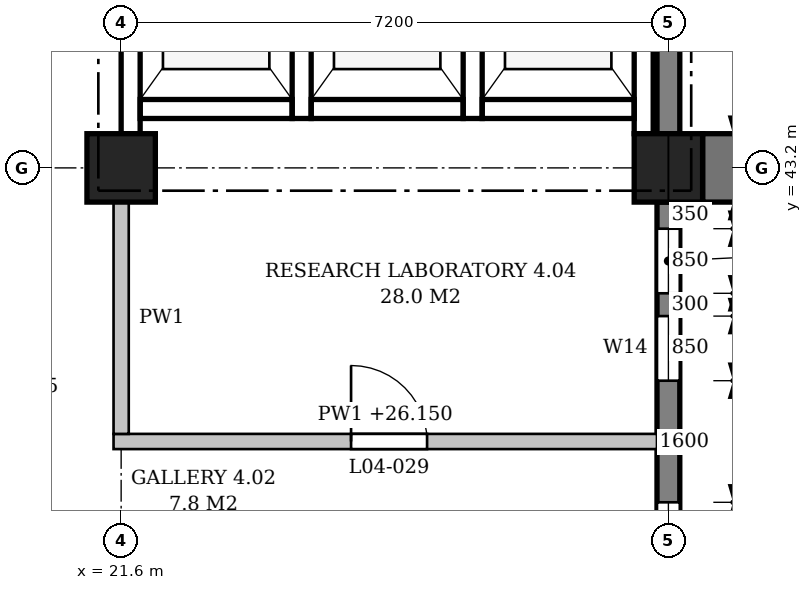
"""IFC4 building model, lengths in metres.
Left out: names, types, materials, properties, quantities, classifications, styles, units other than length and angle.
Written with IfcOpenShell. Run it as: python <this file> out.ifc"""

import sys

from ifc_helpers import new_model, si_unit, direction, frame, frame_2d, origin, origin_2d, place, context, subcontext, project, spatial, polyline, rectangle, outline, extrude, element, fill, save


model = new_model("IFC4")
c1 = context("Model", 3, precision=1e-05, world=origin(), true_north=direction((0.0, 1.0)))
c2 = subcontext(c1, "Body", "Model", "MODEL_VIEW")
j1 = project(units=[si_unit("LENGTHUNIT", "METRE"), si_unit("PLANEANGLEUNIT", "RADIAN")], contexts=[c1])
p1 = place(None, origin())
s1 = spatial("IfcSite", under=j1, at=p1, CompositionType="ELEMENT")
p2 = place(p1, origin())
s2 = spatial("IfcBuilding", under=s1, at=p2, CompositionType="ELEMENT")
p3 = place(p2, frame((0.0, 0.0, 21.6)))
s3 = spatial("IfcBuildingStorey", under=s2, at=p3, CompositionType="ELEMENT", Elevation=21.6)
for number, where, z_axis, x_axis in (
    (1, (21.6, 43.2, 0.0), (0.0, 0.0, 1.0), (1.0, 0.0, 0.0)),
    (2, (28.8, 43.2, 0.0), (0.0, 0.0, 1.0), (1.0, 0.0, 0.0)),
):
    element("IfcColumn", number, at=place(p3, frame(where, z_axis=z_axis, x_axis=x_axis)), inside=s3, PredefinedType="COLUMN", context=c2, shape_type="SweptSolid", body=[
        extrude(rectangle(XDim=0.9, YDim=0.9, at=origin_2d()), origin(), (0.0, 0.0, 1.0), 4.8),
    ])
p4 = place(p3, frame((28.8, 36.45, 0.0), z_axis=(0.0, 0.0, 1.0), x_axis=(0.0, 1.0, 0.0)))
e3 = element("IfcWall", 3, at=p4, inside=s3, PredefinedType="STANDARD", context=c2, shape_type="SweptSolid", body=[
    extrude(rectangle(XDim=6.3, YDim=0.3, at=frame_2d((3.15, 0.0))), origin(), (0.0, 0.0, 1.0), 3.95),
])
p5 = place(p4, frame((0.35, 0.0, 0.9)))
e4 = element("IfcOpeningElement", 4, at=p5, cuts=e3, PredefinedType="OPENING", context=c2, shape_type="SweptSolid", body=[
    extrude(outline(polyline([(0.0, 0.0), (0.85, 0.0), (0.85, 2.05), (0.425, 2.5), (0.0, 2.05), (0.0, 0.0)])), frame((0.0, 0.16, 0.0), z_axis=(0.0, -1.0, 0.0), x_axis=(1.0, 0.0, 0.0)), (0.0, 0.0, 1.0), 0.32),
])
p6 = place(p4, frame((1.5, 0.0, 0.9)))
e5 = element("IfcOpeningElement", 5, at=p6, cuts=e3, PredefinedType="OPENING", context=c2, shape_type="SweptSolid", body=[
    extrude(outline(polyline([(0.0, 0.0), (0.85, 0.0), (0.85, 2.05), (0.425, 2.5), (0.0, 2.05), (0.0, 0.0)])), frame((0.0, 0.16, 0.0), z_axis=(0.0, -1.0, 0.0), x_axis=(1.0, 0.0, 0.0)), (0.0, 0.0, 1.0), 0.32),
])
p7 = place(p4, frame((3.95, 0.0, 0.9)))
e6 = element("IfcOpeningElement", 6, at=p7, cuts=e3, PredefinedType="OPENING", context=c2, shape_type="SweptSolid", body=[
    extrude(outline(polyline([(0.0, 0.0), (0.85, 0.0), (0.85, 2.05), (0.425, 2.5), (0.0, 2.05), (0.0, 0.0)])), frame((0.0, 0.16, 0.0), z_axis=(0.0, -1.0, 0.0), x_axis=(1.0, 0.0, 0.0)), (0.0, 0.0, 1.0), 0.32),
])
p8 = place(p4, frame((5.1, 0.0, 0.9)))
e7 = element("IfcOpeningElement", 7, at=p8, cuts=e3, PredefinedType="OPENING", context=c2, shape_type="SweptSolid", body=[
    extrude(outline(polyline([(0.0, 0.0), (0.85, 0.0), (0.85, 2.05), (0.425, 2.5), (0.0, 2.05), (0.0, 0.0)])), frame((0.0, 0.16, 0.0), z_axis=(0.0, -1.0, 0.0), x_axis=(1.0, 0.0, 0.0)), (0.0, 0.0, 1.0), 0.32),
])
p9 = place(p3, frame((28.8, 43.65, 0.0), z_axis=(0.0, 0.0, 1.0), x_axis=(0.0, 1.0, 0.0)))
e8 = element("IfcWall", 8, at=p9, inside=s3, PredefinedType="STANDARD", context=c2, shape_type="SweptSolid", body=[
    extrude(rectangle(XDim=6.3, YDim=0.3, at=frame_2d((3.15, 0.0))), origin(), (0.0, 0.0, 1.0), 3.95),
])
p10 = place(p9, frame((3.95, 0.0, 0.9)))
e9 = element("IfcOpeningElement", 9, at=p10, cuts=e8, PredefinedType="OPENING", context=c2, shape_type="SweptSolid", body=[
    extrude(outline(polyline([(0.0, 0.0), (0.85, 0.0), (0.85, 2.05), (0.425, 2.5), (0.0, 2.05), (0.0, 0.0)])), frame((0.0, 0.16, 0.0), z_axis=(0.0, -1.0, 0.0), x_axis=(1.0, 0.0, 0.0)), (0.0, 0.0, 1.0), 0.32),
])
p11 = place(p9, frame((5.1, 0.0, 0.9)))
e10 = element("IfcOpeningElement", 10, at=p11, cuts=e8, PredefinedType="OPENING", context=c2, shape_type="SweptSolid", body=[
    extrude(outline(polyline([(0.0, 0.0), (0.85, 0.0), (0.85, 2.05), (0.425, 2.5), (0.0, 2.05), (0.0, 0.0)])), frame((0.0, 0.16, 0.0), z_axis=(0.0, -1.0, 0.0), x_axis=(1.0, 0.0, 0.0)), (0.0, 0.0, 1.0), 0.32),
])
p12 = place(p3, frame((29.25, 43.2, -0.25), z_axis=(0.0, 0.0, 1.0), x_axis=(1.0, 0.0, 0.0)))
e11 = element("IfcWall", 11, at=p12, inside=s3, PredefinedType="POLYGONAL", context=c2, shape_type="SweptSolid", body=[
    extrude(outline(polyline([(1.1, 0.0), (1.1, 19.2), (0.0, 19.2), (0.0, 0.0), (1.1, 0.0)])), frame((0.0, 0.45, 0.0), z_axis=(0.0, -1.0, 0.0), x_axis=(1.0, 0.0, 0.0)), (0.0, 0.0, 1.0), 0.9),
])
p13 = place(p3, frame((21.725, 43.65, -0.25), z_axis=(0.0, 0.0, 1.0), x_axis=(0.0, 1.0, 0.0)))
e12 = element("IfcWall", 12, at=p13, inside=s3, PredefinedType="SHEAR", context=c2, shape_type="SweptSolid", body=[
    extrude(rectangle(XDim=3.5, YDim=0.25, at=frame_2d((1.75, 0.0))), origin(), (0.0, 0.0, 1.0), 4.05),
])
for number, where, z_axis, x_axis in (
    (13, (23.975, 43.85, -0.25), (0.0, 0.0, 1.0), (0.0, 1.0, 0.0)),
    (14, (26.225, 43.85, -0.25), (0.0, 0.0, 1.0), (0.0, 1.0, 0.0)),
):
    element("IfcWall", number, at=place(p3, frame(where, z_axis=z_axis, x_axis=x_axis)), inside=s3, PredefinedType="SHEAR", context=c2, shape_type="SweptSolid", body=[
        extrude(rectangle(XDim=3.3, YDim=0.25, at=frame_2d((1.65, 0.0))), origin(), (0.0, 0.0, 1.0), 4.8),
    ])
p14 = place(p3, frame((28.475, 43.65, -0.25), z_axis=(0.0, 0.0, 1.0), x_axis=(0.0, 1.0, 0.0)))
e15 = element("IfcWall", 15, at=p14, inside=s3, PredefinedType="SHEAR", context=c2, shape_type="SweptSolid", body=[
    extrude(rectangle(XDim=3.5, YDim=0.25, at=frame_2d((1.75, 0.0))), origin(), (0.0, 0.0, 1.0), 4.8),
])
for number, where, z_axis, x_axis in (
    (16, (21.85, 43.975, -0.25), (0.0, 0.0, 1.0), (1.0, 0.0, 0.0)),
    (17, (24.1, 43.975, -0.25), (0.0, 0.0, 1.0), (1.0, 0.0, 0.0)),
    (18, (26.35, 43.975, -0.25), (0.0, 0.0, 1.0), (1.0, 0.0, 0.0)),
):
    element("IfcWall", number, at=place(p3, frame(where, z_axis=z_axis, x_axis=x_axis)), inside=s3, PredefinedType="SHEAR", context=c2, shape_type="SweptSolid", body=[
        extrude(rectangle(XDim=2.0, YDim=0.25, at=frame_2d((1.0, 0.0))), origin(), (0.0, 0.0, 1.0), 4.8),
    ])
p15 = place(p3, frame((21.5, 39.6, 0.0), z_axis=(0.0, 0.0, 1.0), x_axis=(1.0, 0.0, 0.0)))
e19 = element("IfcWall", 19, at=p15, inside=s3, PredefinedType="PARTITIONING", context=c2, shape_type="SweptSolid", body=[
    extrude(outline(polyline([(0.0, 0.0), (7.15, 0.0), (7.15, 3.95), (7.05, 3.95), (7.05, 4.55), (0.35, 4.55), (0.35, 3.8), (0.0, 3.8), (0.0, 0.0)])), frame((0.0, 0.1, 0.0), z_axis=(0.0, -1.0, 0.0), x_axis=(1.0, 0.0, 0.0)), (0.0, 0.0, 1.0), 0.2),
])
p16 = place(p15, frame((3.125, 0.0, 0.0)))
e20 = element("IfcOpeningElement", 20, at=p16, cuts=e19, PredefinedType="OPENING", context=c2, shape_type="SweptSolid", body=[
    extrude(rectangle(XDim=1.0, YDim=2.1, at=frame_2d((0.5, 1.05))), frame((0.0, 0.11, 0.0), z_axis=(0.0, -1.0, 0.0), x_axis=(1.0, 0.0, 0.0)), (0.0, 0.0, 1.0), 0.22),
])
p17 = place(p3, frame((21.6, 39.7, 0.0), z_axis=(0.0, 0.0, 1.0), x_axis=(0.0, 1.0, 0.0)))
e21 = element("IfcWall", 21, at=p17, inside=s3, PredefinedType="PARTITIONING", context=c2, shape_type="SweptSolid", body=[
    extrude(rectangle(XDim=3.05, YDim=0.2, at=frame_2d((1.525, 0.0))), origin(), (0.0, 0.0, 1.0), 3.8),
])
p18 = place(p6, origin())
e22 = element("IfcWindow", 22, at=p18, inside=s3, PartitioningType="SINGLE_PANEL", PredefinedType="WINDOW", context=c2, shape_type="SweptSolid", body=[
    extrude(outline(polyline([(0.0, 0.0), (0.85, 0.0), (0.85, 2.05), (0.425, 2.5), (0.0, 2.05), (0.0, 0.0)])), frame((0.0, 0.03, 0.0), z_axis=(0.0, -1.0, 0.0), x_axis=(1.0, 0.0, 0.0)), (0.0, 0.0, 1.0), 0.06),
])
fill(e5, e22)
p19 = place(p7, origin())
e23 = element("IfcWindow", 23, at=p19, inside=s3, PartitioningType="SINGLE_PANEL", PredefinedType="WINDOW", context=c2, shape_type="SweptSolid", body=[
    extrude(outline(polyline([(0.0, 0.0), (0.85, 0.0), (0.85, 2.05), (0.425, 2.5), (0.0, 2.05), (0.0, 0.0)])), frame((0.0, 0.03, 0.0), z_axis=(0.0, -1.0, 0.0), x_axis=(1.0, 0.0, 0.0)), (0.0, 0.0, 1.0), 0.06),
])
fill(e6, e23)
p20 = place(p8, origin())
e24 = element("IfcWindow", 24, at=p20, inside=s3, PartitioningType="SINGLE_PANEL", PredefinedType="WINDOW", context=c2, shape_type="SweptSolid", body=[
    extrude(outline(polyline([(0.0, 0.0), (0.85, 0.0), (0.85, 2.05), (0.425, 2.5), (0.0, 2.05), (0.0, 0.0)])), frame((0.0, 0.03, 0.0), z_axis=(0.0, -1.0, 0.0), x_axis=(1.0, 0.0, 0.0)), (0.0, 0.0, 1.0), 0.06),
])
fill(e7, e24)
p21 = place(p16, origin())
e25 = element("IfcDoor", 25, at=p21, inside=s3, OperationType="SINGLE_SWING_LEFT", PredefinedType="DOOR", context=c2, shape_type="SweptSolid", body=[
    extrude(rectangle(XDim=1.0, YDim=2.1, at=frame_2d((0.5, 1.05))), frame((0.0, 0.025, 0.0), z_axis=(0.0, -1.0, 0.0), x_axis=(1.0, 0.0, 0.0)), (0.0, 0.0, 1.0), 0.05),
])
fill(e20, e25)
save(model, sys.argv[1])
